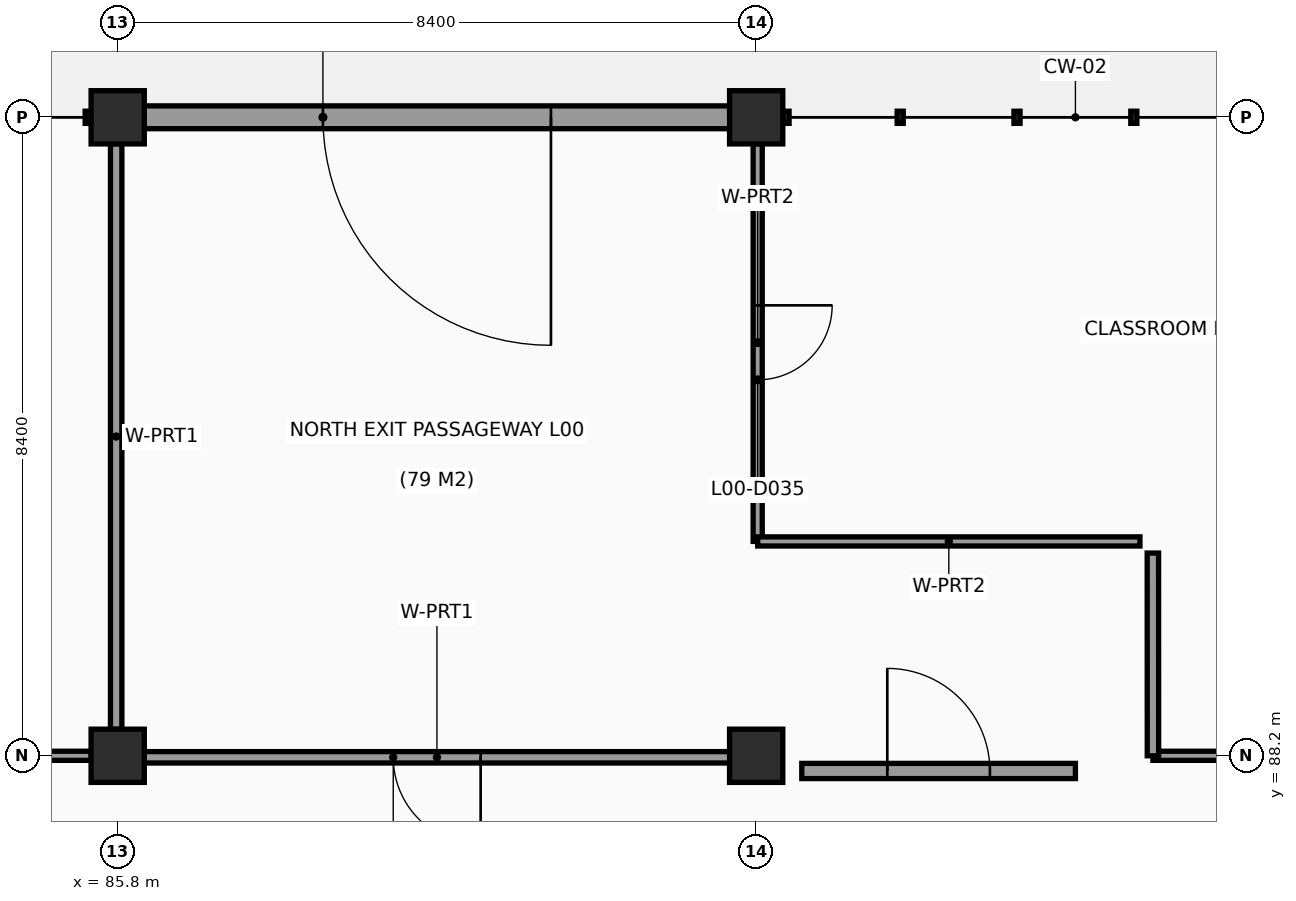
"""IFC4 building model, lengths in metres.
Left out: names, types, materials, properties, quantities, classifications, styles, units other than length and angle.
Written with IfcOpenShell. Run it as: python <this file> out.ifc"""

import sys

from ifc_helpers import new_model, si_unit, direction, frame, frame_2d, origin, origin_2d, place, context, subcontext, project, spatial, rectangle, extrude, element, fill, save


model = new_model("IFC4")
c1 = context("Model", 3, precision=1e-05, world=origin(), true_north=direction((0.0, 1.0)))
c2 = subcontext(c1, "Body", "Model", "MODEL_VIEW")
j1 = project(units=[si_unit("LENGTHUNIT", "METRE"), si_unit("PLANEANGLEUNIT", "RADIAN")], contexts=[c1])
p1 = place(None, origin())
s1 = spatial("IfcSite", under=j1, at=p1, CompositionType="ELEMENT")
p2 = place(p1, origin())
s2 = spatial("IfcBuilding", under=s1, at=p2, CompositionType="ELEMENT")
p3 = place(p2, origin())
s3 = spatial("IfcBuildingStorey", under=s2, at=p3, CompositionType="ELEMENT", Elevation=0.0)
for number, where, z_axis, x_axis in (
    (1, (85.8, 88.2, -0.4), (0.0, 0.0, 1.0), (1.0, 0.0, 0.0)),
    (2, (85.8, 96.6, -0.4), (0.0, 0.0, 1.0), (1.0, 0.0, 0.0)),
    (3, (94.2, 88.2, -0.4), (0.0, 0.0, 1.0), (1.0, 0.0, 0.0)),
    (4, (94.2, 96.6, -0.4), (0.0, 0.0, 1.0), (1.0, 0.0, 0.0)),
):
    element("IfcColumn", number, at=place(p3, frame(where, z_axis=z_axis, x_axis=x_axis)), inside=s3, PredefinedType="COLUMN", context=c2, shape_type="SweptSolid", body=[
        extrude(rectangle(XDim=0.7, YDim=0.7, at=origin_2d()), origin(), (0.0, 0.0, 1.0), 4.6),
    ])
p4 = place(p3, frame((86.148, 96.6, 0.0), z_axis=(0.0, 0.0, 1.0), x_axis=(1.0, 0.0, 0.0)))
e5 = element("IfcWall", 5, at=p4, inside=s3, PredefinedType="SOLIDWALL", context=c2, shape_type="SweptSolid", body=[
    extrude(rectangle(XDim=7.704, YDim=0.3, at=frame_2d((3.852, 0.0))), origin(), (0.0, 0.0, 1.0), 3.22),
])
p5 = place(p4, frame((2.352, 0.0, 0.0)))
e6 = element("IfcOpeningElement", 6, at=p5, cuts=e5, PredefinedType="OPENING", context=c2, shape_type="SweptSolid", body=[
    extrude(rectangle(XDim=3.0, YDim=2.5, at=frame_2d((1.5, 1.25))), frame((0.0, 0.16, 0.0), z_axis=(0.0, -1.0, 0.0), x_axis=(1.0, 0.0, 0.0)), (0.0, 0.0, 1.0), 0.32),
])
p6 = place(p3, frame((98.4, 88.0, 0.0), z_axis=(0.0, 0.0, 1.0), x_axis=(-1.0, 0.0, 0.0)))
e7 = element("IfcWall", 7, at=p6, inside=s3, PredefinedType="PARTITIONING", context=c2, shape_type="SweptSolid", body=[
    extrude(rectangle(XDim=3.6, YDim=0.2, at=frame_2d((1.8, 0.0))), origin(), (0.0, 0.0, 1.0), 3.92),
])
p7 = place(p6, frame((1.125, 0.0, 0.0)))
e8 = element("IfcOpeningElement", 8, at=p7, cuts=e7, PredefinedType="OPENING", context=c2, shape_type="SweptSolid", body=[
    extrude(rectangle(XDim=1.35, YDim=2.15, at=frame_2d((0.675, 1.075))), frame((0.0, 0.11, 0.0), z_axis=(0.0, -1.0, 0.0), x_axis=(1.0, 0.0, 0.0)), (0.0, 0.0, 1.0), 0.22),
])
p8 = place(p3, frame((85.78, 96.252, 0.0), z_axis=(0.0, 0.0, 1.0), x_axis=(0.0, -1.0, 0.0)))
e9 = element("IfcWall", 9, at=p8, inside=s3, PredefinedType="PARTITIONING", context=c2, shape_type="SweptSolid", body=[
    extrude(rectangle(XDim=7.704, YDim=0.15, at=frame_2d((3.852, 0.0))), origin(), (0.0, 0.0, 1.0), 3.32),
])
p9 = place(p3, frame((85.452, 88.2, 0.0), z_axis=(0.0, 0.0, 1.0), x_axis=(-1.0, 0.0, 0.0)))
e10 = element("IfcWall", 10, at=p9, inside=s3, PredefinedType="PARTITIONING", context=c2, shape_type="SweptSolid", body=[
    extrude(rectangle(XDim=7.632, YDim=0.12, at=frame_2d((3.816, 0.0))), origin(), (0.0, 0.0, 1.0), 3.47),
])
p10 = place(p3, frame((86.148, 88.18, 0.0), z_axis=(0.0, 0.0, 1.0), x_axis=(1.0, 0.0, 0.0)))
e11 = element("IfcWall", 11, at=p10, inside=s3, PredefinedType="PARTITIONING", context=c2, shape_type="SweptSolid", body=[
    extrude(rectangle(XDim=7.704, YDim=0.15, at=frame_2d((3.852, 0.0))), origin(), (0.0, 0.0, 1.0), 3.47),
])
p11 = place(p10, frame((3.277, 0.0, 0.0)))
e12 = element("IfcOpeningElement", 12, at=p11, cuts=e11, PredefinedType="OPENING", context=c2, shape_type="SweptSolid", body=[
    extrude(rectangle(XDim=1.15, YDim=2.15, at=frame_2d((0.575, 1.075))), frame((0.0, 0.085, 0.0), z_axis=(0.0, -1.0, 0.0), x_axis=(1.0, 0.0, 0.0)), (0.0, 0.0, 1.0), 0.17),
])
p12 = place(p3, frame((94.22, 91.02, 0.0), z_axis=(0.0, 0.0, 1.0), x_axis=(0.0, 1.0, 0.0)))
e13 = element("IfcWall", 13, at=p12, inside=s3, PredefinedType="PARTITIONING", context=c2, shape_type="SweptSolid", body=[
    extrude(rectangle(XDim=5.232, YDim=0.12, at=frame_2d((2.616, 0.0))), origin(), (0.0, 0.0, 1.0), 3.52),
])
p13 = place(p12, frame((2.126, 0.0, 0.0)))
e14 = element("IfcOpeningElement", 14, at=p13, cuts=e13, PredefinedType="OPENING", context=c2, shape_type="SweptSolid", body=[
    extrude(rectangle(XDim=0.98, YDim=2.12, at=frame_2d((0.49, 1.06))), frame((0.0, 0.07, 0.0), z_axis=(0.0, -1.0, 0.0), x_axis=(1.0, 0.0, 0.0)), (0.0, 0.0, 1.0), 0.14),
])
p14 = place(p3, frame((102.252, 88.2, 0.0), z_axis=(0.0, 0.0, 1.0), x_axis=(-1.0, 0.0, 0.0)))
e15 = element("IfcWall", 15, at=p14, inside=s3, PredefinedType="PARTITIONING", context=c2, shape_type="SweptSolid", body=[
    extrude(rectangle(XDim=2.832, YDim=0.12, at=frame_2d((1.416, 0.0))), origin(), (0.0, 0.0, 1.0), 3.47),
])
p15 = place(p3, frame((99.42, 88.2, 0.0), z_axis=(0.0, 0.0, 1.0), x_axis=(-0.000274624669, 0.999999962291, 0.0)))
e16 = element("IfcWall", 16, at=p15, inside=s3, PredefinedType="PARTITIONING", context=c2, shape_type="SweptSolid", body=[
    extrude(rectangle(XDim=2.667, YDim=0.15, at=frame_2d((1.333, 0.0))), origin(), (0.0, 0.0, 1.0), 3.47),
])
p16 = place(p3, frame((99.249, 91.02, 0.0), z_axis=(0.0, 0.0, 1.0), x_axis=(-1.0, 0.0, 0.0)))
e17 = element("IfcWall", 17, at=p16, inside=s3, PredefinedType="PARTITIONING", context=c2, shape_type="SweptSolid", body=[
    extrude(rectangle(XDim=5.029, YDim=0.12, at=frame_2d((2.514, 0.0))), origin(), (0.0, 0.0, 1.0), 3.47),
])
p17 = place(p5, origin())
e18 = element("IfcDoor", 18, at=p17, inside=s3, OperationType="DOUBLE_DOOR_SINGLE_SWING", PredefinedType="GATE", context=c2, shape_type="SweptSolid", body=[
    extrude(rectangle(XDim=3.0, YDim=2.5, at=frame_2d((1.5, 1.25))), frame((0.0, 0.025, 0.0), z_axis=(0.0, -1.0, 0.0), x_axis=(1.0, 0.0, 0.0)), (0.0, 0.0, 1.0), 0.05),
])
fill(e6, e18)
p18 = place(p7, origin())
e19 = element("IfcDoor", 19, at=p18, inside=s3, OperationType="SINGLE_SWING_RIGHT", PredefinedType="DOOR", context=c2, shape_type="SweptSolid", body=[
    extrude(rectangle(XDim=1.35, YDim=2.15, at=frame_2d((0.675, 1.075))), frame((0.0, 0.025, 0.0), z_axis=(0.0, -1.0, 0.0), x_axis=(1.0, 0.0, 0.0)), (0.0, 0.0, 1.0), 0.05),
])
fill(e8, e19)
p19 = place(p11, origin())
e20 = element("IfcDoor", 20, at=p19, inside=s3, OperationType="SINGLE_SWING_RIGHT", PredefinedType="DOOR", context=c2, shape_type="SweptSolid", body=[
    extrude(rectangle(XDim=1.15, YDim=2.15, at=frame_2d((0.575, 1.075))), frame((0.0, 0.025, 0.0), z_axis=(0.0, -1.0, 0.0), x_axis=(1.0, 0.0, 0.0)), (0.0, 0.0, 1.0), 0.05),
])
fill(e12, e20)
p20 = place(p13, origin())
e21 = element("IfcDoor", 21, at=p20, inside=s3, OperationType="SINGLE_SWING_RIGHT", PredefinedType="DOOR", context=c2, shape_type="SweptSolid", body=[
    extrude(rectangle(XDim=0.98, YDim=2.12, at=frame_2d((0.49, 1.06))), frame((0.0, 0.025, 0.0), z_axis=(0.0, -1.0, 0.0), x_axis=(1.0, 0.0, 0.0)), (0.0, 0.0, 1.0), 0.05),
])
fill(e14, e21)
save(model, sys.argv[1])
